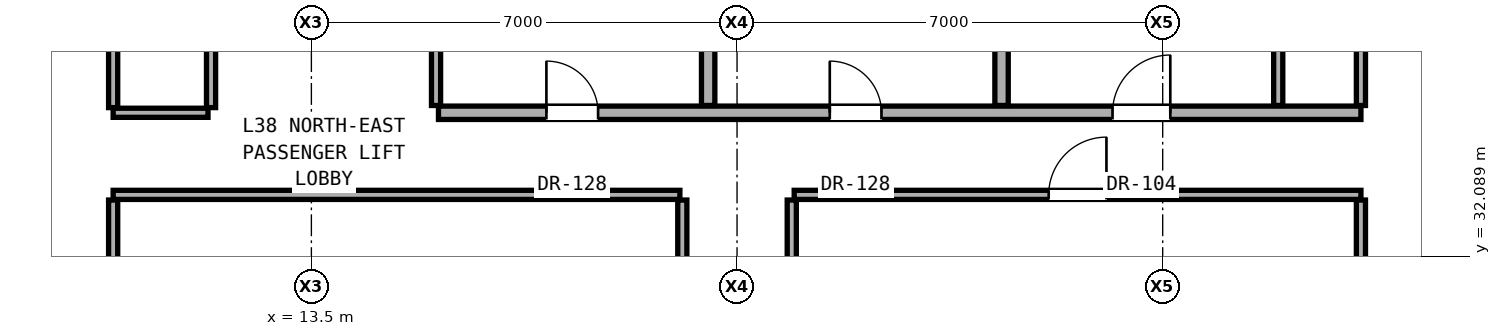
"""IFC4 building model, lengths in metres.
Left out: names, types, materials, properties, quantities, classifications, styles, units other than length and angle.
Written with IfcOpenShell. Run it as: python <this file> out.ifc"""

import sys

from ifc_helpers import new_model, si_unit, direction, frame, frame_2d, origin, place, context, subcontext, project, spatial, rectangle, extrude, element, fill, save


model = new_model("IFC4")
c1 = context("Model", 3, precision=1e-05, world=origin(), true_north=direction((0.0, 1.0)))
c2 = subcontext(c1, "Body", "Model", "MODEL_VIEW")
j1 = project(units=[si_unit("LENGTHUNIT", "METRE"), si_unit("PLANEANGLEUNIT", "RADIAN")], contexts=[c1])
p1 = place(None, origin())
s1 = spatial("IfcSite", under=j1, at=p1, CompositionType="ELEMENT")
p2 = place(p1, origin())
s2 = spatial("IfcBuilding", under=s1, at=p2, CompositionType="ELEMENT")
p3 = place(p2, frame((0.0, 0.0, 134.6)))
s3 = spatial("IfcBuildingStorey", under=s2, at=p3, CompositionType="ELEMENT", Elevation=134.6)
p4 = place(p3, frame((10.24, 33.1, 0.0), z_axis=(0.0, 0.0, 1.0), x_axis=(1.0, 0.0, 0.0)))
e1 = element("IfcWall", 1, at=p4, inside=s3, PredefinedType="PARTITIONING", context=c2, shape_type="SweptSolid", body=[
    extrude(rectangle(XDim=9.32, YDim=0.15, at=frame_2d((4.66, 0.0))), origin(), (0.0, 0.0, 1.0), 2.216),
])
p5 = place(p3, frame((21.44, 33.1, 0.0), z_axis=(0.0, 0.0, 1.0), x_axis=(1.0, 0.0, 0.0)))
e2 = element("IfcWall", 2, at=p5, inside=s3, PredefinedType="PARTITIONING", context=c2, shape_type="SweptSolid", body=[
    extrude(rectangle(XDim=9.32, YDim=0.15, at=frame_2d((4.66, 0.0))), origin(), (0.0, 0.0, 1.0), 2.216),
])
p6 = place(p5, frame((4.185, 0.0, 0.0)))
e3 = element("IfcOpeningElement", 3, at=p6, cuts=e2, PredefinedType="OPENING", context=c2, shape_type="SweptSolid", body=[
    extrude(rectangle(XDim=0.95, YDim=2.15, at=frame_2d((0.475, 1.075))), frame((0.0, 0.085, 0.0), z_axis=(0.0, -1.0, 0.0), x_axis=(1.0, 0.0, 0.0)), (0.0, 0.0, 1.0), 0.17),
])
p7 = place(p3, frame((10.24, 34.45, 0.0), z_axis=(0.0, 0.0, 1.0), x_axis=(1.0, 0.0, 0.0)))
e4 = element("IfcWall", 4, at=p7, inside=s3, PredefinedType="PARTITIONING", context=c2, shape_type="SweptSolid", body=[
    extrude(rectangle(XDim=1.56, YDim=0.15, at=frame_2d((0.78, 0.0))), origin(), (0.0, 0.0, 1.0), 2.216),
])
p8 = place(p3, frame((15.59, 34.45, 0.0), z_axis=(0.0, 0.0, 1.0), x_axis=(1.0, 0.0, 0.0)))
e5 = element("IfcWall", 5, at=p8, inside=s3, PredefinedType="SOLIDWALL", context=c2, shape_type="SweptSolid", body=[
    extrude(rectangle(XDim=15.17, YDim=0.22, at=frame_2d((7.585, 0.0))), origin(), (0.0, 0.0, 1.0), 2.216),
])
p9 = place(p8, frame((6.435, 0.0, 0.0)))
e6 = element("IfcOpeningElement", 6, at=p9, cuts=e5, PredefinedType="OPENING", context=c2, shape_type="SweptSolid", body=[
    extrude(rectangle(XDim=0.85, YDim=2.01, at=frame_2d((0.425, 1.005))), frame((0.0, 0.12, 0.0), z_axis=(0.0, -1.0, 0.0), x_axis=(1.0, 0.0, 0.0)), (0.0, 0.0, 1.0), 0.24),
])
p10 = place(p8, frame((11.085, 0.0, 0.0)))
e7 = element("IfcOpeningElement", 7, at=p10, cuts=e5, PredefinedType="OPENING", context=c2, shape_type="SweptSolid", body=[
    extrude(rectangle(XDim=0.95, YDim=2.15, at=frame_2d((0.475, 1.075))), frame((0.0, 0.12, 0.0), z_axis=(0.0, -1.0, 0.0), x_axis=(1.0, 0.0, 0.0)), (0.0, 0.0, 1.0), 0.24),
])
p11 = place(p8, frame((1.775, 0.0, 0.0)))
e8 = element("IfcOpeningElement", 8, at=p11, cuts=e5, PredefinedType="OPENING", context=c2, shape_type="SweptSolid", body=[
    extrude(rectangle(XDim=0.85, YDim=2.01, at=frame_2d((0.425, 1.005))), frame((0.0, 0.12, 0.0), z_axis=(0.0, -1.0, 0.0), x_axis=(1.0, 0.0, 0.0)), (0.0, 0.0, 1.0), 0.24),
])
p12 = place(p3, frame((10.24, 27.485, 0.0), z_axis=(0.0, 0.0, 1.0), x_axis=(0.0, 1.0, 0.0)))
e9 = element("IfcWall", 9, at=p12, inside=s3, PredefinedType="PARTITIONING", context=c2, shape_type="SweptSolid", body=[
    extrude(rectangle(XDim=5.53, YDim=0.15, at=frame_2d((2.765, 0.0))), origin(), (0.0, 0.0, 1.0), 2.299),
])
p13 = place(p12, frame((2.29, 0.0, 0.0)))
e10 = element("IfcOpeningElement", 10, at=p13, cuts=e9, PredefinedType="OPENING", context=c2, shape_type="SweptSolid", body=[
    extrude(rectangle(XDim=0.95, YDim=2.15, at=frame_2d((0.475, 1.075))), frame((0.0, 0.085, 0.0), z_axis=(0.0, -1.0, 0.0), x_axis=(1.0, 0.0, 0.0)), (0.0, 0.0, 1.0), 0.17),
])
p14 = place(p3, frame((10.24, 34.535, 0.0), z_axis=(0.0, 0.0, 1.0), x_axis=(0.0, 1.0, 0.0)))
e11 = element("IfcWall", 11, at=p14, inside=s3, PredefinedType="PARTITIONING", context=c2, shape_type="SweptSolid", body=[
    extrude(rectangle(XDim=9.13, YDim=0.15, at=frame_2d((4.565, 0.0))), origin(), (0.0, 0.0, 1.0), 2.456),
])
p15 = place(p3, frame((11.85, 34.535, 0.0), z_axis=(0.0, 0.0, 1.0), x_axis=(0.0, 1.0, 0.0)))
e12 = element("IfcWall", 12, at=p15, inside=s3, PredefinedType="PARTITIONING", context=c2, shape_type="SweptSolid", body=[
    extrude(rectangle(XDim=2.795, YDim=0.15, at=frame_2d((1.397, 0.0))), origin(), (0.0, 0.0, 1.0), 3.08),
])
p16 = place(p3, frame((15.55, 34.57, 0.0), z_axis=(0.0, 0.0, 1.0), x_axis=(0.0, 1.0, 0.0)))
e13 = element("IfcWall", 13, at=p16, inside=s3, PredefinedType="PARTITIONING", context=c2, shape_type="SweptSolid", body=[
    extrude(rectangle(XDim=2.76, YDim=0.15, at=frame_2d((1.38, 0.0))), origin(), (0.0, 0.0, 1.0), 2.609),
])
p17 = place(p3, frame((19.6, 27.485, 0.0), z_axis=(0.0, 0.0, 1.0), x_axis=(0.0, 1.0, 0.0)))
e14 = element("IfcWall", 14, at=p17, inside=s3, PredefinedType="PARTITIONING", context=c2, shape_type="SweptSolid", body=[
    extrude(rectangle(XDim=5.53, YDim=0.15, at=frame_2d((2.765, 0.0))), origin(), (0.0, 0.0, 1.0), 2.216),
])
p18 = place(p3, frame((20.025, 34.57, 0.0), z_axis=(0.0, 0.0, 1.0), x_axis=(0.0, 1.0, 0.0)))
e15 = element("IfcWall", 15, at=p18, inside=s3, PredefinedType="SOLIDWALL", context=c2, shape_type="SweptSolid", body=[
    extrude(rectangle(XDim=2.76, YDim=0.22, at=frame_2d((1.38, 0.0))), origin(), (0.0, 0.0, 1.0), 3.08),
])
p19 = place(p3, frame((21.4, 27.485, 0.0), z_axis=(0.0, 0.0, 1.0), x_axis=(0.0, 1.0, 0.0)))
e16 = element("IfcWall", 16, at=p19, inside=s3, PredefinedType="PARTITIONING", context=c2, shape_type="SweptSolid", body=[
    extrude(rectangle(XDim=5.53, YDim=0.15, at=frame_2d((2.765, 0.0))), origin(), (0.0, 0.0, 1.0), 2.216),
])
p20 = place(p3, frame((24.85, 34.57, 0.0), z_axis=(0.0, 0.0, 1.0), x_axis=(0.0, 1.0, 0.0)))
e17 = element("IfcWall", 17, at=p20, inside=s3, PredefinedType="SOLIDWALL", context=c2, shape_type="SweptSolid", body=[
    extrude(rectangle(XDim=2.76, YDim=0.22, at=frame_2d((1.38, 0.0))), origin(), (0.0, 0.0, 1.0), 3.08),
])
p21 = place(p3, frame((29.4, 34.57, 0.0), z_axis=(0.0, 0.0, 1.0), x_axis=(0.0, 1.0, 0.0)))
e18 = element("IfcWall", 18, at=p21, inside=s3, PredefinedType="PARTITIONING", context=c2, shape_type="SweptSolid", body=[
    extrude(rectangle(XDim=2.76, YDim=0.15, at=frame_2d((1.38, 0.0))), origin(), (0.0, 0.0, 1.0), 3.08),
])
p22 = place(p3, frame((30.76, 27.485, 0.0), z_axis=(0.0, 0.0, 1.0), x_axis=(0.0, 1.0, 0.0)))
e19 = element("IfcWall", 19, at=p22, inside=s3, PredefinedType="PARTITIONING", context=c2, shape_type="SweptSolid", body=[
    extrude(rectangle(XDim=5.53, YDim=0.15, at=frame_2d((2.765, 0.0))), origin(), (0.0, 0.0, 1.0), 2.299),
])
p23 = place(p3, frame((30.76, 34.57, 0.0), z_axis=(0.0, 0.0, 1.0), x_axis=(0.0, 1.0, 0.0)))
e20 = element("IfcWall", 20, at=p23, inside=s3, PredefinedType="PARTITIONING", context=c2, shape_type="SweptSolid", body=[
    extrude(rectangle(XDim=9.095, YDim=0.15, at=frame_2d((4.547, 0.0))), origin(), (0.0, 0.0, 1.0), 2.456),
])
p24 = place(p9, origin())
e21 = element("IfcDoor", 21, at=p24, inside=s3, OperationType="SINGLE_SWING_LEFT", PredefinedType="DOOR", context=c2, shape_type="SweptSolid", body=[
    extrude(rectangle(XDim=0.85, YDim=2.01, at=frame_2d((0.425, 1.005))), frame((0.0, 0.025, 0.0), z_axis=(0.0, -1.0, 0.0), x_axis=(1.0, 0.0, 0.0)), (0.0, 0.0, 1.0), 0.05),
])
fill(e6, e21)
p25 = place(p10, origin())
e22 = element("IfcDoor", 22, at=p25, inside=s3, OperationType="SINGLE_SWING_RIGHT", PredefinedType="DOOR", context=c2, shape_type="SweptSolid", body=[
    extrude(rectangle(XDim=0.95, YDim=2.15, at=frame_2d((0.475, 1.075))), frame((0.0, 0.025, 0.0), z_axis=(0.0, -1.0, 0.0), x_axis=(1.0, 0.0, 0.0)), (0.0, 0.0, 1.0), 0.05),
])
fill(e7, e22)
p26 = place(p11, origin())
e23 = element("IfcDoor", 23, at=p26, inside=s3, OperationType="SINGLE_SWING_LEFT", PredefinedType="DOOR", context=c2, shape_type="SweptSolid", body=[
    extrude(rectangle(XDim=0.85, YDim=2.01, at=frame_2d((0.425, 1.005))), frame((0.0, 0.025, 0.0), z_axis=(0.0, -1.0, 0.0), x_axis=(1.0, 0.0, 0.0)), (0.0, 0.0, 1.0), 0.05),
])
fill(e8, e23)
p27 = place(p6, origin())
e24 = element("IfcDoor", 24, at=p27, inside=s3, OperationType="SINGLE_SWING_RIGHT", PredefinedType="DOOR", context=c2, shape_type="SweptSolid", body=[
    extrude(rectangle(XDim=0.95, YDim=2.15, at=frame_2d((0.475, 1.075))), frame((0.0, 0.025, 0.0), z_axis=(0.0, -1.0, 0.0), x_axis=(1.0, 0.0, 0.0)), (0.0, 0.0, 1.0), 0.05),
])
fill(e3, e24)
save(model, sys.argv[1])
